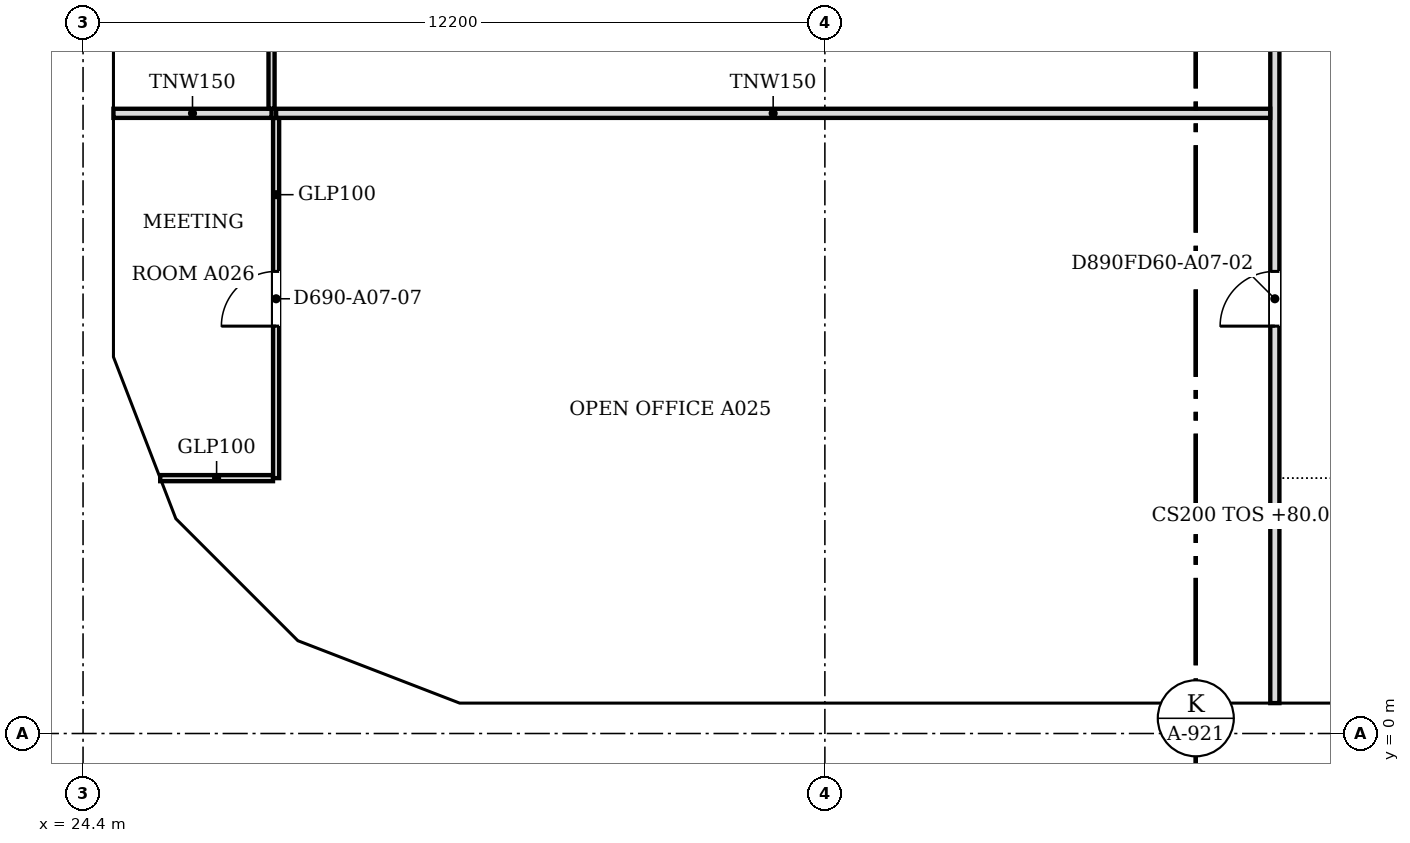
"""IFC4 building model, lengths in metres.
Left out: names, types, materials, properties, quantities, classifications, styles, units other than length and angle.
Written with IfcOpenShell. Run it as: python <this file> out.ifc"""

import sys

from ifc_helpers import new_model, si_unit, direction, frame, frame_2d, origin, place, context, subcontext, project, spatial, polyline, rectangle, outline, extrude, faceted_brep, source, transform, mapped, element, fill, save


model = new_model("IFC4")
c1 = context("Model", 3, precision=1e-05, world=origin(), true_north=direction((0.0, 1.0)))
c2 = subcontext(c1, "Body", "Model", "MODEL_VIEW")
j1 = project(units=[si_unit("LENGTHUNIT", "METRE"), si_unit("PLANEANGLEUNIT", "RADIAN")], contexts=[c1])
p1 = place(None, origin())
s1 = spatial("IfcSite", under=j1, at=p1, CompositionType="ELEMENT")
p2 = place(p1, origin())
s2 = spatial("IfcBuilding", under=s1, at=p2, CompositionType="ELEMENT")
p3 = place(p2, frame((0.0, 0.0, 80.0)))
s3 = spatial("IfcBuildingStorey", under=s2, at=p3, CompositionType="ELEMENT", Elevation=80.0)
m1 = source(origin(), c2, "Body", "Brep", [
    faceted_brep([(3.003, -0.25, 0.0), (6.053, -0.25, 3.8), (3.003, -0.25, 7.6), (0.0, -0.25, 3.8), (0.047, 0.25, 3.859), (3.003, 0.25, 7.6), (6.053, 0.25, 3.8), (3.003, 0.25, 0.0), (0.047, 0.25, 3.741), (0.0, 0.0, 3.8)], [[[0, 1, 2, 3]], [[4, 5, 6, 7, 8]], [[7, 6, 1, 0]], [[6, 5, 2, 1]], [[5, 4, 9, 3, 2]], [[8, 7, 0, 3, 9]], [[8, 9, 4]]]),
])
p4 = place(p3, frame((30.547, 0.25, -3.8), z_axis=(0.0, 0.0, 1.0), x_axis=(1.0, 0.0, 0.0)))
e1 = element("IfcWall", 1, at=p4, inside=s3, PredefinedType="SOLIDWALL", context=c2, shape_type="MappedRepresentation", body=[
    mapped(m1, transform((0.0, 0.0, 0.0), scale=1.0)),
])
m2 = source(origin(), c2, "Body", "SweptSolid", [
    extrude(outline(polyline([(3.005, 0.401), (5.733, 3.8), (3.005, 7.199), (0.319, 3.8), (3.005, 0.401)])), frame((0.0, 0.26, 0.0), z_axis=(0.0, -1.0, 0.0), x_axis=(1.0, 0.0, 0.0)), (0.0, 0.0, 1.0), 0.52),
])
p5 = place(p4, origin())
e2 = element("IfcOpeningElement", 2, at=p5, cuts=e1, PredefinedType="OPENING", context=c2, shape_type="MappedRepresentation", body=[
    mapped(m2, transform((0.0, 0.0, 0.0), scale=1.0)),
])
m3 = source(origin(), c2, "Body", "Brep", [
    faceted_brep([(3.05, -0.25, 0.0), (6.1, -0.25, 3.8), (6.1, -0.25, 3.8), (3.05, -0.25, 7.6), (0.0, -0.25, 3.8), (0.0, 0.25, 3.8), (3.05, 0.25, 7.6), (6.1, 0.25, 3.8), (6.1, 0.25, 3.8), (3.05, 0.25, 0.0)], [[[0, 1, 2, 3, 4]], [[5, 6, 7, 8, 9]], [[9, 8, 1, 0]], [[7, 6, 3, 2]], [[6, 5, 4, 3]], [[5, 9, 0, 4]], [[1, 8, 7, 2]]]),
])
p6 = place(p3, frame((36.6, 0.25, -3.8), z_axis=(0.0, 0.0, 1.0), x_axis=(1.0, 0.0, 0.0)))
e3 = element("IfcWall", 3, at=p6, inside=s3, PredefinedType="SOLIDWALL", context=c2, shape_type="MappedRepresentation", body=[
    mapped(m3, transform((0.0, 0.0, 0.0), scale=1.0)),
])
m4 = source(origin(), c2, "Body", "SweptSolid", [
    extrude(outline(polyline([(3.05, 0.399), (5.78, 3.8), (3.05, 7.201), (0.321, 3.8), (3.05, 0.399)])), frame((0.0, 0.26, 0.0), z_axis=(0.0, -1.0, 0.0), x_axis=(1.0, 0.0, 0.0)), (0.0, 0.0, 1.0), 0.52),
])
p7 = place(p6, origin())
e4 = element("IfcOpeningElement", 4, at=p7, cuts=e3, PredefinedType="OPENING", context=c2, shape_type="MappedRepresentation", body=[
    mapped(m4, transform((0.0, 0.0, 0.0), scale=1.0)),
])
m5 = source(origin(), c2, "Body", "SweptSolid", [
    extrude(outline(polyline([(3.05, 0.0), (6.1, 3.8), (3.05, 7.6), (0.0, 3.8), (3.05, 0.0)])), frame((0.0, 0.25, 0.0), z_axis=(0.0, -1.0, 0.0), x_axis=(1.0, 0.0, 0.0)), (0.0, 0.0, 1.0), 0.5),
])
p8 = place(p3, frame((42.7, 0.25, -3.8), z_axis=(0.0, 0.0, 1.0), x_axis=(1.0, 0.0, 0.0)))
e5 = element("IfcWall", 5, at=p8, inside=s3, PredefinedType="SOLIDWALL", context=c2, shape_type="MappedRepresentation", body=[
    mapped(m5, transform((0.0, 0.0, 0.0), scale=1.0)),
])
p9 = place(p8, origin())
e6 = element("IfcOpeningElement", 6, at=p9, cuts=e5, PredefinedType="OPENING", context=c2, shape_type="MappedRepresentation", body=[
    mapped(m4, transform((0.0, 0.0, 0.0), scale=1.0)),
])
m6 = source(origin(), c2, "Body", "Brep", [
    faceted_brep([(0.093, -0.25, 0.057), (3.143, -0.25, 3.8), (0.093, -0.25, 7.543), (0.0, 0.25, 7.544), (0.047, 0.25, 7.6), (3.143, 0.25, 3.8), (0.047, 0.25, 0.0), (0.0, 0.25, 0.056), (0.047, 0.0, 0.0), (0.047, 0.0, 7.6)], [[[0, 1, 2]], [[3, 4, 5, 6, 7]], [[6, 5, 1, 0, 8]], [[5, 4, 9, 2, 1]], [[4, 3, 9]], [[7, 6, 8]], [[7, 8, 0, 2, 9, 3]]]),
])
p10 = place(p3, frame((24.65, 12.293, -3.8), z_axis=(0.0, 0.0, 1.0), x_axis=(0.0, -1.0, 0.0)))
e7 = element("IfcWall", 7, at=p10, inside=s3, PredefinedType="SOLIDWALL", context=c2, shape_type="MappedRepresentation", body=[
    mapped(m6, transform((0.0, 0.0, 0.0), scale=1.0)),
])
m7 = source(origin(), c2, "Body", "SweptSolid", [
    extrude(outline(polyline([(0.247, 0.641), (2.821, 3.8), (0.247, 6.959), (0.247, 0.641)])), frame((0.0, 0.26, 0.0), z_axis=(0.0, -1.0, 0.0), x_axis=(1.0, 0.0, 0.0)), (0.0, 0.0, 1.0), 0.52),
])
p11 = place(p10, origin())
e8 = element("IfcOpeningElement", 8, at=p11, cuts=e7, PredefinedType="OPENING", context=c2, shape_type="MappedRepresentation", body=[
    mapped(m7, transform((0.0, 0.0, 0.0), scale=1.0)),
])
m8 = source(origin(), c2, "Body", "Brep", [
    faceted_brep([(3.003, -0.25, 0.0), (3.05, -0.25, 0.06), (3.05, -0.25, 7.54), (3.003, -0.25, 7.6), (0.0, -0.25, 3.8), (0.0, 0.25, 3.8), (2.957, 0.25, 7.541), (2.957, 0.25, 0.059), (3.003, 0.0, 0.0), (3.003, 0.0, 7.6)], [[[0, 1, 2, 3, 4]], [[5, 6, 7]], [[1, 0, 8]], [[9, 3, 2]], [[6, 5, 4, 3, 9]], [[5, 7, 8, 0, 4]], [[1, 8, 7, 6, 9, 2]]]),
])
p12 = place(p3, frame((24.65, 9.15, -3.8), z_axis=(0.0, 0.0, 1.0), x_axis=(0.0, -1.0, 0.0)))
e9 = element("IfcWall", 9, at=p12, inside=s3, PredefinedType="SOLIDWALL", context=c2, shape_type="MappedRepresentation", body=[
    mapped(m8, transform((0.0, 0.0, 0.0), scale=1.0)),
])
m9 = source(origin(), c2, "Body", "SweptSolid", [
    extrude(outline(polyline([(2.803, 6.944), (0.319, 3.8), (2.803, 0.656), (2.803, 6.944)])), frame((0.0, 0.26, 0.0), z_axis=(0.0, -1.0, 0.0), x_axis=(1.0, 0.0, 0.0)), (0.0, 0.0, 1.0), 0.52),
])
p13 = place(p12, origin())
e10 = element("IfcOpeningElement", 10, at=p13, cuts=e9, PredefinedType="OPENING", context=c2, shape_type="MappedRepresentation", body=[
    mapped(m9, transform((0.0, 0.0, 0.0), scale=1.0)),
])
m10 = source(origin(), c2, "Body", "Brep", [
    faceted_brep([(0.047, -0.25, 0.0), (2.997, -0.25, 3.8), (0.047, -0.25, 7.6), (0.0, -0.25, 7.541), (0.0, -0.25, 0.059), (0.093, 0.25, 7.54), (2.944, 0.25, 3.868), (2.944, 0.25, 3.732), (0.093, 0.25, 0.06), (2.997, 0.0, 3.8), (0.047, 0.0, 0.0), (0.047, 0.0, 7.6)], [[[0, 1, 2, 3, 4]], [[5, 6, 7, 8]], [[8, 7, 9, 1, 0, 10]], [[6, 5, 11, 2, 1, 9]], [[3, 2, 11]], [[10, 0, 4]], [[8, 10, 4, 3, 11, 5]], [[9, 7, 6]]]),
])
p14 = place(p3, frame((24.633, 6.19, -3.8), z_axis=(0.0, 0.0, 1.0), x_axis=(0.359901446078, -0.932990326376, 0.0)))
e11 = element("IfcWall", 11, at=p14, inside=s3, PredefinedType="SOLIDWALL", context=c2, shape_type="MappedRepresentation", body=[
    mapped(m10, transform((0.0, 0.0, 0.0), scale=1.0)),
])
m11 = source(origin(), c2, "Body", "SweptSolid", [
    extrude(outline(polyline([(0.247, 0.665), (2.681, 3.8), (0.247, 6.935), (0.247, 0.665)])), frame((0.0, 0.26, 0.0), z_axis=(0.0, -1.0, 0.0), x_axis=(1.0, 0.0, 0.0)), (0.0, 0.0, 1.0), 0.52),
])
p15 = place(p14, origin())
e12 = element("IfcOpeningElement", 12, at=p15, cuts=e11, PredefinedType="OPENING", context=c2, shape_type="MappedRepresentation", body=[
    mapped(m11, transform((0.0, 0.0, 0.0), scale=1.0)),
])
m12 = source(origin(), c2, "Body", "Brep", [
    faceted_brep([(2.944, -0.25, 0.0), (2.997, -0.25, 0.068), (2.997, -0.25, 7.532), (2.944, -0.25, 7.6), (0.0, -0.25, 3.8), (0.053, 0.25, 3.868), (2.891, 0.25, 7.532), (2.891, 0.25, 0.068), (0.053, 0.25, 3.732), (2.944, 0.0, 0.0), (2.944, 0.0, 7.6), (0.0, 0.0, 3.8)], [[[0, 1, 2, 3, 4]], [[5, 6, 7, 8]], [[1, 0, 9]], [[10, 3, 2]], [[6, 5, 11, 4, 3, 10]], [[8, 7, 9, 0, 4, 11]], [[8, 11, 5]], [[1, 9, 7, 6, 10, 2]]]),
])
p16 = place(p3, frame((25.712, 3.394, -3.8), z_axis=(0.0, 0.0, 1.0), x_axis=(0.707066050402, -0.707147509625, 0.0)))
e13 = element("IfcWall", 13, at=p16, inside=s3, PredefinedType="SOLIDWALL", context=c2, shape_type="MappedRepresentation", body=[
    mapped(m12, transform((0.0, 0.0, 0.0), scale=1.0)),
])
m13 = source(origin(), c2, "Body", "SweptSolid", [
    extrude(outline(polyline([(2.744, 6.934), (0.316, 3.8), (2.744, 0.666), (2.744, 6.934)])), frame((0.0, 0.26, 0.0), z_axis=(0.0, -1.0, 0.0), x_axis=(1.0, 0.0, 0.0)), (0.0, 0.0, 1.0), 0.52),
])
p17 = place(p16, origin())
e14 = element("IfcOpeningElement", 14, at=p17, cuts=e13, PredefinedType="OPENING", context=c2, shape_type="MappedRepresentation", body=[
    mapped(m13, transform((0.0, 0.0, 0.0), scale=1.0)),
])
m14 = source(origin(), c2, "Body", "Brep", [
    faceted_brep([(0.053, -0.25, 0.0), (3.003, -0.25, 3.8), (0.053, -0.25, 7.6), (0.0, -0.25, 7.532), (0.0, -0.25, 0.068), (0.106, 0.25, 7.532), (2.957, 0.25, 3.86), (2.957, 0.25, 3.74), (0.106, 0.25, 0.068), (3.003, 0.0, 3.8), (0.053, 0.0, 0.0), (0.053, 0.0, 7.6)], [[[0, 1, 2, 3, 4]], [[5, 6, 7, 8]], [[8, 7, 9, 1, 0, 10]], [[6, 5, 11, 2, 1, 9]], [[3, 2, 11]], [[10, 0, 4]], [[8, 10, 4, 3, 11, 5]], [[9, 7, 6]]]),
])
p18 = place(p3, frame((27.744, 1.331, -3.8), z_axis=(0.0, 0.0, 1.0), x_axis=(0.932970071518, -0.359953949349, 0.0)))
e15 = element("IfcWall", 15, at=p18, inside=s3, PredefinedType="SOLIDWALL", context=c2, shape_type="MappedRepresentation", body=[
    mapped(m14, transform((0.0, 0.0, 0.0), scale=1.0)),
])
m15 = source(origin(), c2, "Body", "SweptSolid", [
    extrude(outline(polyline([(0.253, 0.665), (2.687, 3.8), (0.253, 6.935), (0.253, 0.665)])), frame((0.0, 0.26, 0.0), z_axis=(0.0, -1.0, 0.0), x_axis=(1.0, 0.0, 0.0)), (0.0, 0.0, 1.0), 0.52),
])
p19 = place(p18, origin())
e16 = element("IfcOpeningElement", 16, at=p19, cuts=e15, PredefinedType="OPENING", context=c2, shape_type="MappedRepresentation", body=[
    mapped(m15, transform((0.0, 0.0, 0.0), scale=1.0)),
])
p20 = place(p2, frame((0.0, 0.0, 83.8)))
s4 = spatial("IfcBuildingStorey", under=s2, at=p20, CompositionType="ELEMENT", Elevation=83.8)
m16 = source(origin(), c2, "Body", "Brep", [
    faceted_brep([(0.047, -0.25, 0.0), (3.05, -0.25, 3.8), (0.047, -0.25, 7.6), (0.0, -0.25, 7.54), (0.0, -0.25, 0.06), (0.093, 0.25, 7.541), (3.05, 0.25, 3.8), (0.093, 0.25, 0.059), (0.047, 0.0, 0.0), (0.047, 0.0, 7.6)], [[[0, 1, 2, 3, 4]], [[5, 6, 7]], [[7, 6, 1, 0, 8]], [[6, 5, 9, 2, 1]], [[3, 2, 9]], [[8, 0, 4]], [[7, 8, 4, 3, 9, 5]]]),
])
p21 = place(p20, frame((30.5, 0.25, -3.8), z_axis=(0.0, 0.0, 1.0), x_axis=(1.0, 0.0, 0.0)))
e17 = element("IfcWall", 17, at=p21, inside=s4, PredefinedType="SOLIDWALL", context=c2, shape_type="MappedRepresentation", body=[
    mapped(m16, transform((0.0, 0.0, 0.0), scale=1.0)),
])
m17 = source(origin(), c2, "Body", "SweptSolid", [
    extrude(outline(polyline([(0.247, 0.656), (2.731, 3.8), (0.247, 6.944), (0.247, 0.656)])), frame((0.0, 0.26, 0.0), z_axis=(0.0, -1.0, 0.0), x_axis=(1.0, 0.0, 0.0)), (0.0, 0.0, 1.0), 0.52),
])
p22 = place(p21, origin())
e18 = element("IfcOpeningElement", 18, at=p22, cuts=e17, PredefinedType="OPENING", context=c2, shape_type="MappedRepresentation", body=[
    mapped(m17, transform((0.0, 0.0, 0.0), scale=1.0)),
])
m18 = source(origin(), c2, "Body", "Brep", [
    faceted_brep([(2.95, -0.25, 0.0), (2.997, -0.25, 0.059), (2.997, -0.25, 7.541), (2.95, -0.25, 7.6), (0.0, -0.25, 3.8), (0.053, 0.25, 3.868), (2.904, 0.25, 7.54), (2.904, 0.25, 0.06), (0.053, 0.25, 3.732), (2.95, 0.0, 0.0), (2.95, 0.0, 7.6), (0.0, 0.0, 3.8)], [[[0, 1, 2, 3, 4]], [[5, 6, 7, 8]], [[1, 0, 9]], [[10, 3, 2]], [[6, 5, 11, 4, 3, 10]], [[8, 7, 9, 0, 4, 11]], [[8, 11, 5]], [[1, 9, 7, 6, 10, 2]]]),
])
p23 = place(p20, frame((27.794, 1.312, -3.8), z_axis=(0.0, 0.0, 1.0), x_axis=(0.932973525033, -0.359944998003, 0.0)))
e19 = element("IfcWall", 19, at=p23, inside=s4, PredefinedType="SOLIDWALL", context=c2, shape_type="MappedRepresentation", body=[
    mapped(m18, transform((0.0, 0.0, 0.0), scale=1.0)),
])
m19 = source(origin(), c2, "Body", "SweptSolid", [
    extrude(outline(polyline([(2.75, 6.935), (0.316, 3.8), (2.75, 0.665), (2.75, 6.935)])), frame((0.0, 0.26, 0.0), z_axis=(0.0, -1.0, 0.0), x_axis=(1.0, 0.0, 0.0)), (0.0, 0.0, 1.0), 0.52),
])
p24 = place(p23, origin())
e20 = element("IfcOpeningElement", 20, at=p24, cuts=e19, PredefinedType="OPENING", context=c2, shape_type="MappedRepresentation", body=[
    mapped(m19, transform((0.0, 0.0, 0.0), scale=1.0)),
])
p25 = place(p20, frame((33.55, 0.25, -3.8), z_axis=(0.0, 0.0, 1.0), x_axis=(1.0, 0.0, 0.0)))
e21 = element("IfcWall", 21, at=p25, inside=s4, PredefinedType="SOLIDWALL", context=c2, shape_type="MappedRepresentation", body=[
    mapped(m3, transform((0.0, 0.0, 0.0), scale=1.0)),
])
p26 = place(p25, origin())
e22 = element("IfcOpeningElement", 22, at=p26, cuts=e21, PredefinedType="OPENING", context=c2, shape_type="MappedRepresentation", body=[
    mapped(m4, transform((0.0, 0.0, 0.0), scale=1.0)),
])
p27 = place(p20, frame((39.65, 0.25, -3.8), z_axis=(0.0, 0.0, 1.0), x_axis=(1.0, 0.0, 0.0)))
e23 = element("IfcWall", 23, at=p27, inside=s4, PredefinedType="SOLIDWALL", context=c2, shape_type="MappedRepresentation", body=[
    mapped(m5, transform((0.0, 0.0, 0.0), scale=1.0)),
])
p28 = place(p27, origin())
e24 = element("IfcOpeningElement", 24, at=p28, cuts=e23, PredefinedType="OPENING", context=c2, shape_type="MappedRepresentation", body=[
    mapped(m4, transform((0.0, 0.0, 0.0), scale=1.0)),
])
m20 = source(origin(), c2, "Body", "Brep", [
    faceted_brep([(3.096, -0.25, 0.0), (6.1, -0.25, 3.8), (3.096, -0.25, 7.6), (0.047, -0.25, 3.857), (0.047, -0.25, 3.743), (0.0, 0.25, 3.8), (3.096, 0.25, 7.6), (6.053, 0.25, 3.859), (6.053, 0.25, 3.741), (3.096, 0.25, 0.0), (6.1, -0.0, 3.8), (0.0, 0.0, 3.8)], [[[0, 1, 2, 3, 4]], [[5, 6, 7, 8, 9]], [[9, 8, 10, 1, 0]], [[7, 6, 2, 1, 10]], [[6, 5, 11, 3, 2]], [[5, 9, 0, 4, 11]], [[11, 4, 3]], [[10, 8, 7]]]),
])
p29 = place(p20, frame((24.65, 12.247, -3.8), z_axis=(0.0, 0.0, 1.0), x_axis=(0.0, -1.0, 0.0)))
e25 = element("IfcWall", 25, at=p29, inside=s4, PredefinedType="SOLIDWALL", context=c2, shape_type="MappedRepresentation", body=[
    mapped(m20, transform((0.0, 0.0, 0.0), scale=1.0)),
])
m21 = source(origin(), c2, "Body", "SweptSolid", [
    extrude(outline(polyline([(3.094, 0.399), (5.781, 3.8), (3.094, 7.201), (0.323, 3.8), (3.094, 0.399)])), frame((0.0, 0.26, 0.0), z_axis=(0.0, -1.0, 0.0), x_axis=(1.0, 0.0, 0.0)), (0.0, 0.0, 1.0), 0.52),
])
p30 = place(p29, origin())
e26 = element("IfcOpeningElement", 26, at=p30, cuts=e25, PredefinedType="OPENING", context=c2, shape_type="MappedRepresentation", body=[
    mapped(m21, transform((0.0, 0.0, 0.0), scale=1.0)),
])
m22 = source(origin(), c2, "Body", "Brep", [
    faceted_brep([(2.95, -0.25, 0.0), (3.003, -0.25, 0.068), (3.003, -0.25, 7.532), (2.95, -0.25, 7.6), (0.0, -0.25, 3.8), (0.047, 0.25, 3.86), (2.898, 0.25, 7.532), (2.898, 0.25, 0.068), (0.047, 0.25, 3.74), (2.95, 0.0, 0.0), (2.95, 0.0, 7.6), (0.0, 0.0, 3.8)], [[[0, 1, 2, 3, 4]], [[5, 6, 7, 8]], [[1, 0, 9]], [[10, 3, 2]], [[6, 5, 11, 4, 3, 10]], [[8, 7, 9, 0, 4, 11]], [[8, 11, 5]], [[1, 9, 7, 6, 10, 2]]]),
])
p31 = place(p20, frame((24.65, 6.146, -3.8), z_axis=(0.0, 0.0, 1.0), x_axis=(0.359953949349, -0.932970071518, 0.0)))
e27 = element("IfcWall", 27, at=p31, inside=s4, PredefinedType="SOLIDWALL", context=c2, shape_type="MappedRepresentation", body=[
    mapped(m22, transform((0.0, 0.0, 0.0), scale=1.0)),
])
p32 = place(p31, origin())
e28 = element("IfcOpeningElement", 28, at=p32, cuts=e27, PredefinedType="OPENING", context=c2, shape_type="MappedRepresentation", body=[
    mapped(m19, transform((0.0, 0.0, 0.0), scale=1.0)),
])
m23 = source(origin(), c2, "Body", "Brep", [
    faceted_brep([(0.053, -0.25, 0.0), (2.997, -0.25, 3.8), (0.053, -0.25, 7.6), (0.0, -0.25, 7.532), (0.0, -0.25, 0.068), (0.106, 0.25, 7.532), (2.944, 0.25, 3.868), (2.944, 0.25, 3.732), (0.106, 0.25, 0.068), (2.997, 0.0, 3.8), (0.053, 0.0, 0.0), (0.053, 0.0, 7.6)], [[[0, 1, 2, 3, 4]], [[5, 6, 7, 8]], [[8, 7, 9, 1, 0, 10]], [[6, 5, 11, 2, 1, 9]], [[3, 2, 11]], [[10, 0, 4]], [[8, 10, 4, 3, 11, 5]], [[9, 7, 6]]]),
])
p33 = place(p20, frame((25.675, 3.431, -3.8), z_axis=(0.0, 0.0, 1.0), x_axis=(0.707106781187, -0.707106781187, 0.0)))
e29 = element("IfcWall", 29, at=p33, inside=s4, PredefinedType="SOLIDWALL", context=c2, shape_type="MappedRepresentation", body=[
    mapped(m23, transform((0.0, 0.0, 0.0), scale=1.0)),
])
m24 = source(origin(), c2, "Body", "SweptSolid", [
    extrude(outline(polyline([(0.253, 0.666), (2.681, 3.8), (0.253, 6.934), (0.253, 0.666)])), frame((0.0, 0.26, 0.0), z_axis=(0.0, -1.0, 0.0), x_axis=(1.0, 0.0, 0.0)), (0.0, 0.0, 1.0), 0.52),
])
p34 = place(p33, origin())
e30 = element("IfcOpeningElement", 30, at=p34, cuts=e29, PredefinedType="OPENING", context=c2, shape_type="MappedRepresentation", body=[
    mapped(m24, transform((0.0, 0.0, 0.0), scale=1.0)),
])
p35 = place(p3, frame((44.0, 0.5, 0.0), z_axis=(0.0, 0.0, 1.0), x_axis=(0.0, 1.0, 0.0)))
e31 = element("IfcWall", 31, at=p35, inside=s3, PredefinedType="PARTITIONING", context=c2, shape_type="SweptSolid", body=[
    extrude(rectangle(XDim=21.424, YDim=0.15, at=frame_2d((10.712, 0.0))), origin(), (0.0, 0.0, 1.0), 3.067),
])
m25 = source(origin(), c2, "Body", "SweptSolid", [
    extrude(rectangle(XDim=0.9, YDim=2.1, at=frame_2d((0.45, 1.05))), frame((0.0, 0.085, 0.0), z_axis=(0.0, -1.0, 0.0), x_axis=(1.0, 0.0, 0.0)), (0.0, 0.0, 1.0), 0.17),
])
p36 = place(p35, frame((6.2, 0.0, 0.0)))
e32 = element("IfcOpeningElement", 32, at=p36, cuts=e31, PredefinedType="OPENING", context=c2, shape_type="MappedRepresentation", body=[
    mapped(m25, transform((0.0, 0.0, 0.0), scale=1.0)),
])
p37 = place(p35, frame((15.1, 0.0, 0.0)))
e33 = element("IfcOpeningElement", 33, at=p37, cuts=e31, PredefinedType="OPENING", context=c2, shape_type="MappedRepresentation", body=[
    mapped(m25, transform((0.0, 0.0, 0.0), scale=1.0)),
])
p38 = place(p3, frame((25.669, 4.2, 0.0), z_axis=(0.0, 0.0, 1.0), x_axis=(1.0, 0.0, 0.0)))
e34 = element("IfcWall", 34, at=p38, inside=s3, PredefinedType="PARTITIONING", context=c2, shape_type="SweptSolid", body=[
    extrude(rectangle(XDim=1.855, YDim=0.1, at=frame_2d((0.928, 0.0))), origin(), (0.0, 0.0, 1.0), 3.067),
])
p39 = place(p3, frame((27.575, 4.2, 0.0), z_axis=(0.0, 0.0, 1.0), x_axis=(0.0, 1.0, 0.0)))
e35 = element("IfcWall", 35, at=p39, inside=s3, PredefinedType="PARTITIONING", context=c2, shape_type="SweptSolid", body=[
    extrude(rectangle(XDim=5.924, YDim=0.1, at=frame_2d((2.962, 0.0))), origin(), (0.0, 0.0, 1.0), 3.067),
])
m26 = source(origin(), c2, "Body", "SweptSolid", [
    extrude(rectangle(XDim=0.9, YDim=2.1, at=frame_2d((0.45, 1.05))), frame((0.0, 0.06, 0.0), z_axis=(0.0, -1.0, 0.0), x_axis=(1.0, 0.0, 0.0)), (0.0, 0.0, 1.0), 0.12),
])
p40 = place(p39, frame((2.5, 0.0, 0.0)))
e36 = element("IfcOpeningElement", 36, at=p40, cuts=e35, PredefinedType="OPENING", context=c2, shape_type="MappedRepresentation", body=[
    mapped(m26, transform((0.0, 0.0, 0.0), scale=1.0)),
])
p41 = place(p3, frame((24.9, 10.2, 0.0), z_axis=(0.0, 0.0, 1.0), x_axis=(1.0, 0.0, 0.0)))
e37 = element("IfcWall", 37, at=p41, inside=s3, PredefinedType="PARTITIONING", context=c2, shape_type="SweptSolid", body=[
    extrude(rectangle(XDim=2.6, YDim=0.15, at=frame_2d((1.3, 0.0))), origin(), (0.0, 0.0, 1.0), 3.067),
])
p42 = place(p3, frame((27.575, 10.2, 0.0), z_axis=(0.0, 0.0, 1.0), x_axis=(1.0, 0.0, 0.0)))
e38 = element("IfcWall", 38, at=p42, inside=s3, PredefinedType="PARTITIONING", context=c2, shape_type="SweptSolid", body=[
    extrude(rectangle(XDim=16.349, YDim=0.15, at=frame_2d((8.175, 0.0))), origin(), (0.0, 0.0, 1.0), 3.067),
])
p43 = place(p3, frame((27.5, 10.276, 0.0), z_axis=(0.0, 0.0, 1.0), x_axis=(0.0, 1.0, 0.0)))
e39 = element("IfcWall", 39, at=p43, inside=s3, PredefinedType="PARTITIONING", context=c2, shape_type="SweptSolid", body=[
    extrude(rectangle(XDim=8.448, YDim=0.1, at=frame_2d((4.224, 0.0))), origin(), (0.0, 0.0, 1.0), 3.067),
])
p44 = place(p43, frame((3.8, 0.0, 0.0)))
e40 = element("IfcOpeningElement", 40, at=p44, cuts=e39, PredefinedType="OPENING", context=c2, shape_type="MappedRepresentation", body=[
    mapped(m26, transform((0.0, 0.0, 0.0), scale=1.0)),
])
m27 = source(origin(), c2, "Body", "SweptSolid", [
    extrude(rectangle(XDim=0.9, YDim=2.1, at=frame_2d((0.45, 1.05))), frame((0.0, 0.025, 0.0), z_axis=(0.0, -1.0, 0.0), x_axis=(1.0, 0.0, 0.0)), (0.0, 0.0, 1.0), 0.05),
])
p45 = place(p36, origin())
e41 = element("IfcDoor", 41, at=p45, inside=s3, OperationType="SINGLE_SWING_LEFT", PredefinedType="DOOR", context=c2, shape_type="MappedRepresentation", body=[
    mapped(m27, transform((0.0, 0.0, 0.0), scale=1.0)),
])
fill(e32, e41)
p46 = place(p40, origin())
e42 = element("IfcDoor", 42, at=p46, inside=s3, OperationType="SINGLE_SWING_LEFT", PredefinedType="DOOR", context=c2, shape_type="MappedRepresentation", body=[
    mapped(m27, transform((0.0, 0.0, 0.0), scale=1.0)),
])
fill(e36, e42)
save(model, sys.argv[1])
